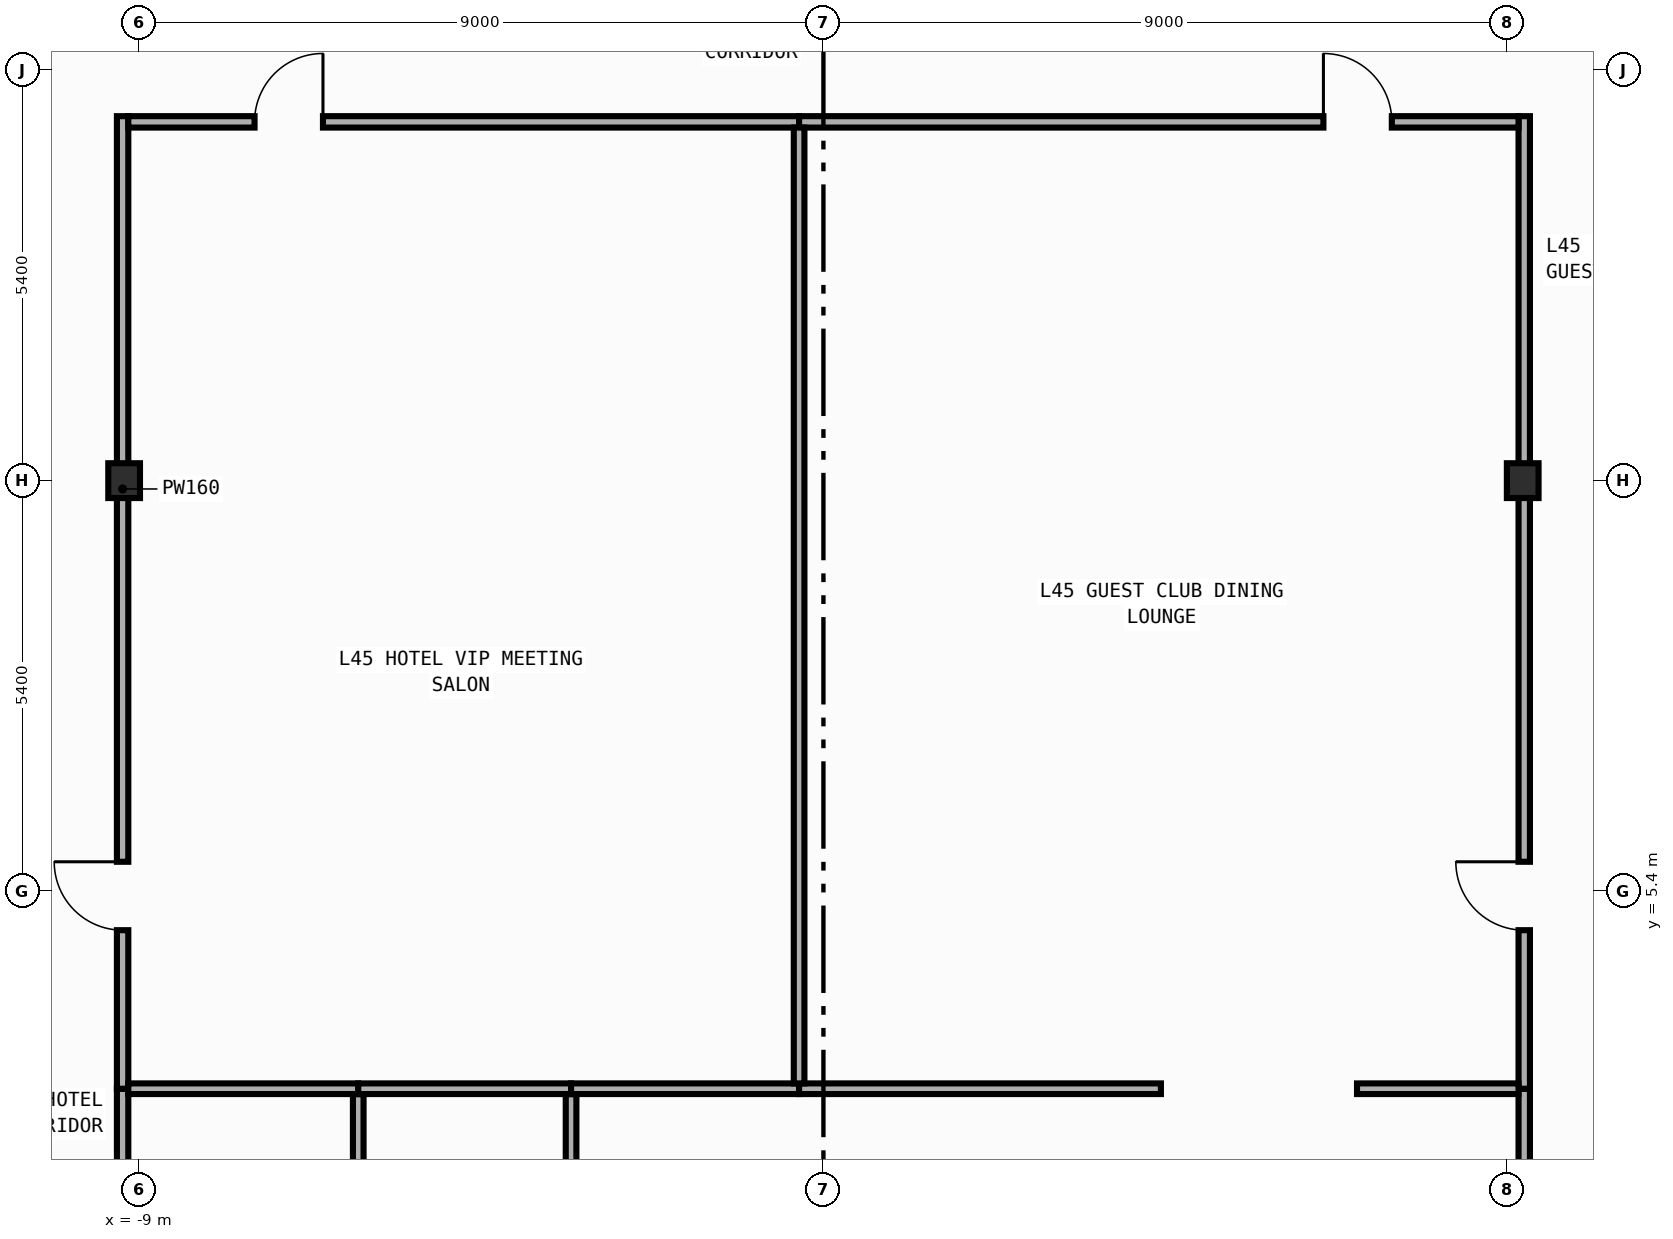
"""IFC4 building model, lengths in metres.
Left out: names, types, materials, properties, quantities, classifications, styles, units other than length and angle.
Written with IfcOpenShell. Run it as: python <this file> out.ifc"""

import sys

from ifc_helpers import new_model, si_unit, direction, frame, frame_2d, origin, origin_2d, place, context, subcontext, project, spatial, rectangle, i_section, extrude, element, fill, save


model = new_model("IFC4")
c1 = context("Model", 3, precision=1e-05, world=origin(), true_north=direction((0.0, 1.0)))
c2 = subcontext(c1, "Body", "Model", "MODEL_VIEW")
j1 = project(units=[si_unit("LENGTHUNIT", "METRE"), si_unit("PLANEANGLEUNIT", "RADIAN")], contexts=[c1])
p1 = place(None, origin())
s1 = spatial("IfcSite", under=j1, at=p1, CompositionType="ELEMENT")
p2 = place(p1, origin())
s2 = spatial("IfcBuilding", under=s1, at=p2, CompositionType="ELEMENT")
p3 = place(p2, frame((0.0, 0.0, 195.4)))
s3 = spatial("IfcBuildingStorey", under=s2, at=p3, CompositionType="ELEMENT", Elevation=195.4)
for number, where, z_axis, x_axis in (
    (1, (-9.2, 10.8, 0.0), (0.0, 0.0, 1.0), (1.0, 0.0, 0.0)),
    (2, (9.2, 10.8, 0.0), (0.0, 0.0, 1.0), (1.0, 0.0, 0.0)),
):
    element("IfcColumn", number, at=place(p3, frame(where, z_axis=z_axis, x_axis=x_axis)), inside=s3, PredefinedType="COLUMN", context=c2, shape_type="SweptSolid", body=[
        extrude(i_section(OverallWidth=0.417, OverallDepth=0.458, WebThickness=0.03, FlangeThickness=0.05, FilletRadius=0.022, at=origin_2d()), origin(), (0.0, 0.0, 1.0), 3.8),
    ])
p4 = place(p3, frame((-9.22, -13.795, 0.0), z_axis=(0.0, 0.0, 1.0), x_axis=(0.0, 1.0, 0.0)))
e3 = element("IfcWall", 3, at=p4, inside=s3, PredefinedType="PARTITIONING", context=c2, shape_type="SweptSolid", body=[
    extrude(rectangle(XDim=16.595, YDim=0.15, at=frame_2d((8.297, 0.0))), origin(), (0.0, 0.0, 1.0), 2.952),
])
p5 = place(p4, frame((7.949, 0.0, 0.0)))
e4 = element("IfcOpeningElement", 4, at=p5, cuts=e3, PredefinedType="OPENING", context=c2, shape_type="SweptSolid", body=[
    extrude(rectangle(XDim=0.9, YDim=2.15, at=frame_2d((0.45, 1.075))), frame((0.0, 0.085, 0.0), z_axis=(0.0, -1.0, 0.0), x_axis=(1.0, 0.0, 0.0)), (0.0, 0.0, 1.0), 0.17),
])
p6 = place(p3, frame((-9.22, 2.8, 0.0), z_axis=(0.0, 0.0, 1.0), x_axis=(0.0, 1.0, 0.0)))
e5 = element("IfcWall", 5, at=p6, inside=s3, PredefinedType="PARTITIONING", context=c2, shape_type="SweptSolid", body=[
    extrude(rectangle(XDim=12.795, YDim=0.15, at=frame_2d((6.397, 0.0))), origin(), (0.0, 0.0, 1.0), 2.952),
])
p7 = place(p6, frame((2.086, 0.0, 0.0)))
e6 = element("IfcOpeningElement", 6, at=p7, cuts=e5, PredefinedType="OPENING", context=c2, shape_type="SweptSolid", body=[
    extrude(rectangle(XDim=0.9, YDim=2.15, at=frame_2d((0.45, 1.075))), frame((0.0, 0.085, 0.0), z_axis=(0.0, -1.0, 0.0), x_axis=(1.0, 0.0, 0.0)), (0.0, 0.0, 1.0), 0.17),
])
p8 = place(p3, frame((9.22, -13.795, 0.0), z_axis=(0.0, 0.0, 1.0), x_axis=(0.0, 1.0, 0.0)))
e7 = element("IfcWall", 7, at=p8, inside=s3, PredefinedType="PARTITIONING", context=c2, shape_type="SweptSolid", body=[
    extrude(rectangle(XDim=16.595, YDim=0.15, at=frame_2d((8.297, 0.0))), origin(), (0.0, 0.0, 1.0), 2.952),
])
p9 = place(p8, frame((7.949, 0.0, 0.0)))
e8 = element("IfcOpeningElement", 8, at=p9, cuts=e7, PredefinedType="OPENING", context=c2, shape_type="SweptSolid", body=[
    extrude(rectangle(XDim=0.9, YDim=2.15, at=frame_2d((0.45, 1.075))), frame((0.0, 0.085, 0.0), z_axis=(0.0, -1.0, 0.0), x_axis=(1.0, 0.0, 0.0)), (0.0, 0.0, 1.0), 0.17),
])
p10 = place(p3, frame((9.22, 2.8, 0.0), z_axis=(0.0, 0.0, 1.0), x_axis=(0.0, 1.0, 0.0)))
e9 = element("IfcWall", 9, at=p10, inside=s3, PredefinedType="PARTITIONING", context=c2, shape_type="SweptSolid", body=[
    extrude(rectangle(XDim=12.795, YDim=0.15, at=frame_2d((6.397, 0.0))), origin(), (0.0, 0.0, 1.0), 2.952),
])
p11 = place(p10, frame((2.086, 0.0, 0.0)))
e10 = element("IfcOpeningElement", 10, at=p11, cuts=e9, PredefinedType="OPENING", context=c2, shape_type="SweptSolid", body=[
    extrude(rectangle(XDim=0.9, YDim=2.15, at=frame_2d((0.45, 1.075))), frame((0.0, 0.085, 0.0), z_axis=(0.0, -1.0, 0.0), x_axis=(1.0, 0.0, 0.0)), (0.0, 0.0, 1.0), 0.17),
])
p12 = place(p3, frame((-9.145, 15.52, 0.0), z_axis=(0.0, 0.0, 1.0), x_axis=(1.0, 0.0, 0.0)))
e11 = element("IfcWall", 11, at=p12, inside=s3, PredefinedType="PARTITIONING", context=c2, shape_type="SweptSolid", body=[
    extrude(rectangle(XDim=8.825, YDim=0.15, at=frame_2d((4.413, 0.0))), origin(), (0.0, 0.0, 1.0), 3.54),
])
p13 = place(p12, frame((1.661, 0.0, 0.0)))
e12 = element("IfcOpeningElement", 12, at=p13, cuts=e11, PredefinedType="OPENING", context=c2, shape_type="SweptSolid", body=[
    extrude(rectangle(XDim=0.9, YDim=2.15, at=frame_2d((0.45, 1.075))), frame((0.0, 0.085, 0.0), z_axis=(0.0, -1.0, 0.0), x_axis=(1.0, 0.0, 0.0)), (0.0, 0.0, 1.0), 0.17),
])
p14 = place(p3, frame((-0.32, 15.52, 0.0), z_axis=(0.0, 0.0, 1.0), x_axis=(1.0, 0.0, 0.0)))
e13 = element("IfcWall", 13, at=p14, inside=s3, PredefinedType="PARTITIONING", context=c2, shape_type="SweptSolid", body=[
    extrude(rectangle(XDim=9.465, YDim=0.15, at=frame_2d((4.732, 0.0))), origin(), (0.0, 0.0, 1.0), 3.54),
])
p15 = place(p14, frame((6.898, 0.0, 0.0)))
e14 = element("IfcOpeningElement", 14, at=p15, cuts=e13, PredefinedType="OPENING", context=c2, shape_type="SweptSolid", body=[
    extrude(rectangle(XDim=0.9, YDim=2.15, at=frame_2d((0.45, 1.075))), frame((0.0, 0.085, 0.0), z_axis=(0.0, -1.0, 0.0), x_axis=(1.0, 0.0, 0.0)), (0.0, 0.0, 1.0), 0.17),
])
p16 = place(p3, frame((-6.12, -13.645, 0.0), z_axis=(0.0, 0.0, 1.0), x_axis=(0.0, 1.0, 0.0)))
e15 = element("IfcWall", 15, at=p16, inside=s3, PredefinedType="PARTITIONING", context=c2, shape_type="SweptSolid", body=[
    extrude(rectangle(XDim=16.375, YDim=0.14, at=frame_2d((8.188, 0.0))), origin(), (0.0, 0.0, 1.0), 3.54),
])
p17 = place(p3, frame((-9.145, 2.8, 0.0), z_axis=(0.0, 0.0, 1.0), x_axis=(1.0, 0.0, 0.0)))
e16 = element("IfcWall", 16, at=p17, inside=s3, PredefinedType="PARTITIONING", context=c2, shape_type="SweptSolid", body=[
    extrude(rectangle(XDim=3.025, YDim=0.14, at=frame_2d((1.512, 0.0))), origin(), (0.0, 0.0, 1.0), 3.54),
])
p18 = place(p3, frame((-3.32, -13.645, 0.0), z_axis=(0.0, 0.0, 1.0), x_axis=(0.0, 1.0, 0.0)))
e17 = element("IfcWall", 17, at=p18, inside=s3, PredefinedType="PARTITIONING", context=c2, shape_type="SweptSolid", body=[
    extrude(rectangle(XDim=16.375, YDim=0.14, at=frame_2d((8.188, 0.0))), origin(), (0.0, 0.0, 1.0), 3.54),
])
p19 = place(p3, frame((-6.12, 2.8, 0.0), z_axis=(0.0, 0.0, 1.0), x_axis=(1.0, 0.0, 0.0)))
e18 = element("IfcWall", 18, at=p19, inside=s3, PredefinedType="PARTITIONING", context=c2, shape_type="SweptSolid", body=[
    extrude(rectangle(XDim=2.8, YDim=0.14, at=frame_2d((1.4, 0.0))), origin(), (0.0, 0.0, 1.0), 3.54),
])
p20 = place(p3, frame((-3.32, 2.8, 0.0), z_axis=(0.0, 0.0, 1.0), x_axis=(1.0, 0.0, 0.0)))
e19 = element("IfcWall", 19, at=p20, inside=s3, PredefinedType="PARTITIONING", context=c2, shape_type="SweptSolid", body=[
    extrude(rectangle(XDim=3.0, YDim=0.14, at=frame_2d((1.5, 0.0))), origin(), (0.0, 0.0, 1.0), 3.54),
])
p21 = place(p3, frame((-0.32, 2.8, 0.0), z_axis=(0.0, 0.0, 1.0), x_axis=(1.0, 0.0, 0.0)))
e20 = element("IfcWall", 20, at=p21, inside=s3, PredefinedType="PARTITIONING", context=c2, shape_type="SweptSolid", body=[
    extrude(rectangle(XDim=4.76, YDim=0.14, at=frame_2d((2.38, 0.0))), origin(), (0.0, 0.0, 1.0), 3.54),
])
p22 = place(p3, frame((7.02, 2.8, 0.0), z_axis=(0.0, 0.0, 1.0), x_axis=(1.0, 0.0, 0.0)))
e21 = element("IfcWall", 21, at=p22, inside=s3, PredefinedType="PARTITIONING", context=c2, shape_type="SweptSolid", body=[
    extrude(rectangle(XDim=2.125, YDim=0.14, at=frame_2d((1.062, 0.0))), origin(), (0.0, 0.0, 1.0), 3.54),
])
p23 = place(p3, frame((-0.32, 2.87, 0.0), z_axis=(0.0, 0.0, 1.0), x_axis=(0.0, 1.0, 0.0)))
e22 = element("IfcWall", 22, at=p23, inside=s3, PredefinedType="PARTITIONING", context=c2, shape_type="SweptSolid", body=[
    extrude(rectangle(XDim=12.575, YDim=0.14, at=frame_2d((6.288, 0.0))), origin(), (0.0, 0.0, 1.0), 3.54),
])
p24 = place(p7, origin())
e23 = element("IfcDoor", 23, at=p24, inside=s3, OperationType="SINGLE_SWING_RIGHT", PredefinedType="DOOR", context=c2, shape_type="SweptSolid", body=[
    extrude(rectangle(XDim=0.9, YDim=2.15, at=frame_2d((0.45, 1.075))), frame((0.0, 0.025, 0.0), z_axis=(0.0, -1.0, 0.0), x_axis=(1.0, 0.0, 0.0)), (0.0, 0.0, 1.0), 0.05),
])
fill(e6, e23)
p25 = place(p11, origin())
e24 = element("IfcDoor", 24, at=p25, inside=s3, OperationType="SINGLE_SWING_RIGHT", PredefinedType="DOOR", context=c2, shape_type="SweptSolid", body=[
    extrude(rectangle(XDim=0.9, YDim=2.15, at=frame_2d((0.45, 1.075))), frame((0.0, 0.025, 0.0), z_axis=(0.0, -1.0, 0.0), x_axis=(1.0, 0.0, 0.0)), (0.0, 0.0, 1.0), 0.05),
])
fill(e10, e24)
p26 = place(p13, origin())
e25 = element("IfcDoor", 25, at=p26, inside=s3, OperationType="SINGLE_SWING_RIGHT", PredefinedType="DOOR", context=c2, shape_type="SweptSolid", body=[
    extrude(rectangle(XDim=0.9, YDim=2.15, at=frame_2d((0.45, 1.075))), frame((0.0, 0.025, 0.0), z_axis=(0.0, -1.0, 0.0), x_axis=(1.0, 0.0, 0.0)), (0.0, 0.0, 1.0), 0.05),
])
fill(e12, e25)
p27 = place(p15, origin())
e26 = element("IfcDoor", 26, at=p27, inside=s3, OperationType="SINGLE_SWING_LEFT", PredefinedType="DOOR", context=c2, shape_type="SweptSolid", body=[
    extrude(rectangle(XDim=0.9, YDim=2.15, at=frame_2d((0.45, 1.075))), frame((0.0, 0.025, 0.0), z_axis=(0.0, -1.0, 0.0), x_axis=(1.0, 0.0, 0.0)), (0.0, 0.0, 1.0), 0.05),
])
fill(e14, e26)
save(model, sys.argv[1])
